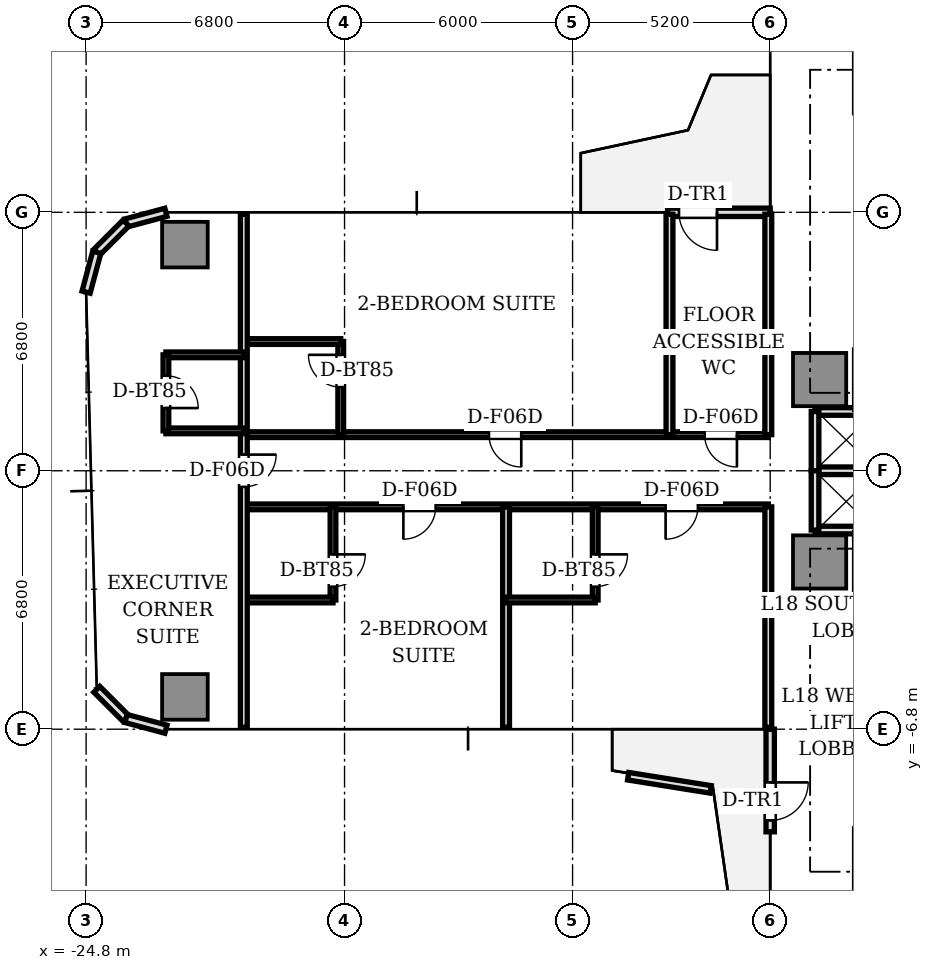
"""IFC4 building model, lengths in metres.
Left out: names, types, materials, properties, quantities, classifications, styles, units other than length and angle.
Written with IfcOpenShell. Run it as: python <this file> out.ifc"""

import sys

from ifc_helpers import new_model, si_unit, direction, frame, frame_2d, origin, origin_2d, place, context, subcontext, project, spatial, rectangle, extrude, source, transform, mapped, element, fill, save


model = new_model("IFC4")
c1 = context("Model", 3, precision=1e-05, world=origin(), true_north=direction((0.0, 1.0)))
c2 = subcontext(c1, "Body", "Model", "MODEL_VIEW")
j1 = project(units=[si_unit("LENGTHUNIT", "METRE"), si_unit("PLANEANGLEUNIT", "RADIAN")], contexts=[c1])
p1 = place(None, origin())
s1 = spatial("IfcSite", under=j1, at=p1, CompositionType="ELEMENT")
p2 = place(p1, origin())
s2 = spatial("IfcBuilding", under=s1, at=p2, CompositionType="ELEMENT")
p3 = place(p2, frame((0.0, 0.0, 67.8)))
s3 = spatial("IfcBuildingStorey", under=s2, at=p3, CompositionType="ELEMENT", Elevation=67.8)
m1 = source(origin(), c2, "Body", "SweptSolid", [
    extrude(rectangle(XDim=1.4, YDim=1.4, at=origin_2d()), origin(), (0.0, 0.0, 1.0), 3.11),
])
for number, where, z_axis, x_axis in (
    (1, (-5.5, 2.4, 0.0), (0.0, 0.0, 1.0), (1.0, 0.0, 0.0)),
    (2, (-5.5, -2.4, 0.0), (0.0, 0.0, 1.0), (1.0, 0.0, 0.0)),
):
    element("IfcColumn", number, at=place(p3, frame(where, z_axis=z_axis, x_axis=x_axis)), inside=s3, PredefinedType="COLUMN", context=c2, shape_type="MappedRepresentation", body=[
        mapped(m1, transform((0.0, 0.0, 0.0), scale=1.0)),
    ])
m2 = source(origin(), c2, "Body", "SweptSolid", [
    extrude(rectangle(XDim=1.2, YDim=1.2, at=origin_2d()), origin(), (0.0, 0.0, 1.0), 3.11),
])
for number, where, z_axis, x_axis in (
    (3, (-22.2, 5.95, 0.0), (0.0, 0.0, 1.0), (1.0, 0.0, 0.0)),
    (4, (-22.2, -5.95, 0.0), (0.0, 0.0, 1.0), (1.0, 0.0, 0.0)),
):
    element("IfcColumn", number, at=place(p3, frame(where, z_axis=z_axis, x_axis=x_axis)), inside=s3, PredefinedType="COLUMN", context=c2, shape_type="MappedRepresentation", body=[
        mapped(m2, transform((0.0, 0.0, 0.0), scale=1.0)),
    ])
p4 = place(p3, frame((-6.8, 6.8, 0.0), z_axis=(0.0, 0.0, 1.0), x_axis=(-1.0, 0.0, 0.0)))
e5 = element("IfcWall", 5, at=p4, inside=s3, PredefinedType="STANDARD", context=c2, shape_type="SweptSolid", body=[
    extrude(rectangle(XDim=2.7, YDim=0.22, at=frame_2d((1.35, 0.0))), origin(), (0.0, 0.0, 1.0), 3.11),
])
p5 = place(p4, frame((1.4, 0.0, 0.0)))
e6 = element("IfcOpeningElement", 6, at=p5, cuts=e5, PredefinedType="OPENING", context=c2, shape_type="SweptSolid", body=[
    extrude(rectangle(XDim=1.0, YDim=2.2, at=frame_2d((0.5, 1.1))), frame((0.0, 0.12, 0.0), z_axis=(0.0, -1.0, 0.0), x_axis=(1.0, 0.0, 0.0)), (0.0, 0.0, 1.0), 0.24),
])
for number, where, z_axis, x_axis in (
    (7, (-22.7, 6.8, 0.0), (0.0, 0.0, 1.0), (-0.966, -0.259, 0.0)),
    (8, (-23.75, 6.519, 0.0), (0.0, 0.0, 1.0), (-0.707, -0.707, 0.0)),
    (9, (-24.519, 5.75, 0.0), (0.0, 0.0, 1.0), (-0.259, -0.966, 0.0)),
    (10, (-24.519, -5.75, 0.0), (0.0, 0.0, 1.0), (0.707, -0.707, 0.0)),
    (11, (-23.75, -6.519, 0.0), (0.0, 0.0, 1.0), (0.966, -0.259, 0.0)),
):
    element("IfcWall", number, at=place(p3, frame(where, z_axis=z_axis, x_axis=x_axis)), inside=s3, PredefinedType="STANDARD", context=c2, shape_type="SweptSolid", body=[
        extrude(rectangle(XDim=1.087, YDim=0.22, at=frame_2d((0.543, 0.0))), origin(), (0.0, 0.0, 1.0), 3.11),
    ])
p6 = place(p3, frame((-6.8, -6.8, 0.0), z_axis=(0.0, 0.0, 1.0), x_axis=(0.0, -1.0, 0.0)))
e12 = element("IfcWall", 12, at=p6, inside=s3, PredefinedType="STANDARD", context=c2, shape_type="SweptSolid", body=[
    extrude(rectangle(XDim=2.7, YDim=0.22, at=frame_2d((1.35, 0.0))), origin(), (0.0, 0.0, 1.0), 3.11),
])
p7 = place(p6, frame((1.4, 0.0, 0.0)))
e13 = element("IfcOpeningElement", 13, at=p7, cuts=e12, PredefinedType="OPENING", context=c2, shape_type="SweptSolid", body=[
    extrude(rectangle(XDim=1.0, YDim=2.2, at=frame_2d((0.5, 1.1))), frame((0.0, 0.12, 0.0), z_axis=(0.0, -1.0, 0.0), x_axis=(1.0, 0.0, 0.0)), (0.0, 0.0, 1.0), 0.24),
])
p8 = place(p3, frame((-10.537, -8.037, 0.0), z_axis=(0.0, 0.0, 1.0), x_axis=(0.987467647017, -0.1578215641, 0.0)))
e14 = element("IfcWall", 14, at=p8, inside=s3, PredefinedType="PARAPET", context=c2, shape_type="SweptSolid", body=[
    extrude(rectangle(XDim=2.198, YDim=0.2, at=frame_2d((1.099, 0.0))), origin(), (0.0, 0.0, 1.0), 0.65),
])
for number, where, z_axis, x_axis in (
    (15, (-5.62, 1.56, 0.0), (0.0, 0.0, 1.0), (1.0, 0.0, 0.0)),
    (16, (-5.62, -1.56, 0.0), (0.0, 0.0, 1.0), (1.0, 0.0, 0.0)),
    (17, (-5.62, 0.0, 0.0), (0.0, 0.0, 1.0), (1.0, 0.0, 0.0)),
):
    element("IfcWall", number, at=place(p3, frame(where, z_axis=z_axis, x_axis=x_axis)), inside=s3, PredefinedType="SOLIDWALL", context=c2, shape_type="SweptSolid", body=[
        extrude(rectangle(XDim=1.64, YDim=0.2, at=frame_2d((0.82, 0.0))), origin(), (0.0, 0.0, 1.0), 2.66),
    ])
for number, where, z_axis, x_axis in (
    (18, (-5.62, 0.0, 0.0), (0.0, 0.0, 1.0), (0.0, 1.0, 0.0)),
    (19, (-5.62, -1.56, 0.0), (0.0, 0.0, 1.0), (0.0, 1.0, 0.0)),
):
    element("IfcWall", number, at=place(p3, frame(where, z_axis=z_axis, x_axis=x_axis)), inside=s3, PredefinedType="SOLIDWALL", context=c2, shape_type="SweptSolid", body=[
        extrude(rectangle(XDim=1.56, YDim=0.2, at=frame_2d((0.78, 0.0))), origin(), (0.0, 0.0, 1.0), 2.66),
    ])
p9 = place(p3, frame((-6.85, -0.95, 0.0), z_axis=(0.0, 0.0, 1.0), x_axis=(-1.0, 0.0, 0.0)))
e20 = element("IfcWall", 20, at=p9, inside=s3, PredefinedType="PARTITIONING", context=c2, shape_type="SweptSolid", body=[
    extrude(rectangle(XDim=13.8, YDim=0.15, at=frame_2d((6.9, 0.0))), origin(), (0.0, 0.0, 1.0), 2.66),
])
p10 = place(p9, frame((1.852, 0.0, 0.0)))
e21 = element("IfcOpeningElement", 21, at=p10, cuts=e20, PredefinedType="OPENING", context=c2, shape_type="SweptSolid", body=[
    extrude(rectangle(XDim=0.85, YDim=2.1, at=frame_2d((0.425, 1.05))), frame((0.0, 0.085, 0.0), z_axis=(0.0, -1.0, 0.0), x_axis=(1.0, 0.0, 0.0)), (0.0, 0.0, 1.0), 0.17),
])
p11 = place(p9, frame((8.752, 0.0, 0.0)))
e22 = element("IfcOpeningElement", 22, at=p11, cuts=e20, PredefinedType="OPENING", context=c2, shape_type="SweptSolid", body=[
    extrude(rectangle(XDim=0.85, YDim=2.1, at=frame_2d((0.425, 1.05))), frame((0.0, 0.085, 0.0), z_axis=(0.0, -1.0, 0.0), x_axis=(1.0, 0.0, 0.0)), (0.0, 0.0, 1.0), 0.17),
])
p12 = place(p3, frame((-6.85, 0.95, 0.0), z_axis=(0.0, 0.0, 1.0), x_axis=(-1.0, 0.0, 0.0)))
e23 = element("IfcWall", 23, at=p12, inside=s3, PredefinedType="PARTITIONING", context=c2, shape_type="SweptSolid", body=[
    extrude(rectangle(XDim=13.8, YDim=0.15, at=frame_2d((6.9, 0.0))), origin(), (0.0, 0.0, 1.0), 2.66),
])
p13 = place(p12, frame((0.825, 0.0, 0.0)))
e24 = element("IfcOpeningElement", 24, at=p13, cuts=e23, PredefinedType="OPENING", context=c2, shape_type="SweptSolid", body=[
    extrude(rectangle(XDim=0.85, YDim=2.1, at=frame_2d((0.425, 1.05))), frame((0.0, 0.085, 0.0), z_axis=(0.0, -1.0, 0.0), x_axis=(1.0, 0.0, 0.0)), (0.0, 0.0, 1.0), 0.17),
])
p14 = place(p12, frame((6.5, 0.0, 0.0)))
e25 = element("IfcOpeningElement", 25, at=p14, cuts=e23, PredefinedType="OPENING", context=c2, shape_type="SweptSolid", body=[
    extrude(rectangle(XDim=0.85, YDim=2.1, at=frame_2d((0.425, 1.05))), frame((0.0, 0.085, 0.0), z_axis=(0.0, -1.0, 0.0), x_axis=(1.0, 0.0, 0.0)), (0.0, 0.0, 1.0), 0.17),
])
for number, where, z_axis, x_axis in (
    (26, (-6.85, -0.95, 0.0), (0.0, 0.0, 1.0), (0.0, -1.0, 0.0)),
    (27, (-6.85, 6.75, 0.0), (0.0, 0.0, 1.0), (0.0, -1.0, 0.0)),
    (28, (-13.75, -0.95, 0.0), (0.0, 0.0, 1.0), (0.0, -1.0, 0.0)),
):
    element("IfcWall", number, at=place(p3, frame(where, z_axis=z_axis, x_axis=x_axis)), inside=s3, PredefinedType="PARTITIONING", context=c2, shape_type="SweptSolid", body=[
        extrude(rectangle(XDim=5.8, YDim=0.18, at=frame_2d((2.9, 0.0))), origin(), (0.0, 0.0, 1.0), 2.66),
    ])
p15 = place(p3, frame((-11.404, -0.95, 0.0), z_axis=(0.0, 0.0, 1.0), x_axis=(0.0, -1.0, 0.0)))
e29 = element("IfcWall", 29, at=p15, inside=s3, PredefinedType="PARTITIONING", context=c2, shape_type="SweptSolid", body=[
    extrude(rectangle(XDim=2.45, YDim=0.15, at=frame_2d((1.225, 0.0))), origin(), (0.0, 0.0, 1.0), 2.66),
])
p16 = place(p15, frame((1.25, 0.0, 0.0)))
e30 = element("IfcOpeningElement", 30, at=p16, cuts=e29, PredefinedType="OPENING", context=c2, shape_type="SweptSolid", body=[
    extrude(rectangle(XDim=0.85, YDim=2.1, at=frame_2d((0.425, 1.05))), frame((0.0, 0.085, 0.0), z_axis=(0.0, -1.0, 0.0), x_axis=(1.0, 0.0, 0.0)), (0.0, 0.0, 1.0), 0.17),
])
p17 = place(p3, frame((-11.404, -3.4, 0.0), z_axis=(0.0, 0.0, 1.0), x_axis=(-1.0, 0.0, 0.0)))
e31 = element("IfcWall", 31, at=p17, inside=s3, PredefinedType="PARTITIONING", context=c2, shape_type="SweptSolid", body=[
    extrude(rectangle(XDim=2.346, YDim=0.15, at=frame_2d((1.173, 0.0))), origin(), (0.0, 0.0, 1.0), 2.63),
])
p18 = place(p3, frame((-18.304, -0.95, 0.0), z_axis=(0.0, 0.0, 1.0), x_axis=(0.0, -1.0, 0.0)))
e32 = element("IfcWall", 32, at=p18, inside=s3, PredefinedType="PARTITIONING", context=c2, shape_type="SweptSolid", body=[
    extrude(rectangle(XDim=2.45, YDim=0.15, at=frame_2d((1.225, 0.0))), origin(), (0.0, 0.0, 1.0), 2.66),
])
p19 = place(p18, frame((1.25, 0.0, 0.0)))
e33 = element("IfcOpeningElement", 33, at=p19, cuts=e32, PredefinedType="OPENING", context=c2, shape_type="SweptSolid", body=[
    extrude(rectangle(XDim=0.85, YDim=2.1, at=frame_2d((0.425, 1.05))), frame((0.0, 0.085, 0.0), z_axis=(0.0, -1.0, 0.0), x_axis=(1.0, 0.0, 0.0)), (0.0, 0.0, 1.0), 0.17),
])
p20 = place(p3, frame((-18.304, -3.4, 0.0), z_axis=(0.0, 0.0, 1.0), x_axis=(-1.0, 0.0, 0.0)))
e34 = element("IfcWall", 34, at=p20, inside=s3, PredefinedType="PARTITIONING", context=c2, shape_type="SweptSolid", body=[
    extrude(rectangle(XDim=2.346, YDim=0.15, at=frame_2d((1.173, 0.0))), origin(), (0.0, 0.0, 1.0), 2.63),
])
p21 = place(p3, frame((-9.45, 0.95, 0.0), z_axis=(0.0, 0.0, 1.0), x_axis=(0.0, 1.0, 0.0)))
e35 = element("IfcWall", 35, at=p21, inside=s3, PredefinedType="PARTITIONING", context=c2, shape_type="SweptSolid", body=[
    extrude(rectangle(XDim=5.8, YDim=0.18, at=frame_2d((2.9, 0.0))), origin(), (0.0, 0.0, 1.0), 2.66),
])
p22 = place(p3, frame((-18.1, 0.95, 0.0), z_axis=(0.0, 0.0, 1.0), x_axis=(0.0, 1.0, 0.0)))
e36 = element("IfcWall", 36, at=p22, inside=s3, PredefinedType="PARTITIONING", context=c2, shape_type="SweptSolid", body=[
    extrude(rectangle(XDim=2.45, YDim=0.15, at=frame_2d((1.225, 0.0))), origin(), (0.0, 0.0, 1.0), 2.66),
])
p23 = place(p22, frame((1.25, 0.0, 0.0)))
e37 = element("IfcOpeningElement", 37, at=p23, cuts=e36, PredefinedType="OPENING", context=c2, shape_type="SweptSolid", body=[
    extrude(rectangle(XDim=0.85, YDim=2.1, at=frame_2d((0.425, 1.05))), frame((0.0, 0.085, 0.0), z_axis=(0.0, -1.0, 0.0), x_axis=(1.0, 0.0, 0.0)), (0.0, 0.0, 1.0), 0.17),
])
p24 = place(p3, frame((-18.1, 3.4, 0.0), z_axis=(0.0, 0.0, 1.0), x_axis=(-1.0, 0.0, 0.0)))
e38 = element("IfcWall", 38, at=p24, inside=s3, PredefinedType="PARTITIONING", context=c2, shape_type="SweptSolid", body=[
    extrude(rectangle(XDim=2.55, YDim=0.15, at=frame_2d((1.275, 0.0))), origin(), (0.0, 0.0, 1.0), 2.63),
])
p25 = place(p3, frame((-20.65, 6.75, 0.0), z_axis=(0.0, 0.0, 1.0), x_axis=(0.0, -1.0, 0.0)))
e39 = element("IfcWall", 39, at=p25, inside=s3, PredefinedType="PARTITIONING", context=c2, shape_type="SweptSolid", body=[
    extrude(rectangle(XDim=13.5, YDim=0.18, at=frame_2d((6.75, 0.0))), origin(), (0.0, 0.0, 1.0), 2.66),
])
p26 = place(p25, frame((6.325, 0.0, 0.0)))
e40 = element("IfcOpeningElement", 40, at=p26, cuts=e39, PredefinedType="OPENING", context=c2, shape_type="SweptSolid", body=[
    extrude(rectangle(XDim=0.85, YDim=2.1, at=frame_2d((0.425, 1.05))), frame((0.0, 0.1, 0.0), z_axis=(0.0, -1.0, 0.0), x_axis=(1.0, 0.0, 0.0)), (0.0, 0.0, 1.0), 0.2),
])
p27 = place(p3, frame((-20.65, 1.05, 0.0), z_axis=(0.0, 0.0, 1.0), x_axis=(-1.0, 0.0, 0.0)))
e41 = element("IfcWall", 41, at=p27, inside=s3, PredefinedType="PARTITIONING", context=c2, shape_type="SweptSolid", body=[
    extrude(rectangle(XDim=2.05, YDim=0.15, at=frame_2d((1.025, 0.0))), origin(), (0.0, 0.0, 1.0), 2.66),
])
p28 = place(p3, frame((-20.65, 3.05, 0.0), z_axis=(0.0, 0.0, 1.0), x_axis=(-1.0, 0.0, 0.0)))
e42 = element("IfcWall", 42, at=p28, inside=s3, PredefinedType="PARTITIONING", context=c2, shape_type="SweptSolid", body=[
    extrude(rectangle(XDim=2.05, YDim=0.15, at=frame_2d((1.025, 0.0))), origin(), (0.0, 0.0, 1.0), 2.63),
])
p29 = place(p3, frame((-22.7, 3.05, 0.0), z_axis=(0.0, 0.0, 1.0), x_axis=(0.0, -1.0, 0.0)))
e43 = element("IfcWall", 43, at=p29, inside=s3, PredefinedType="PARTITIONING", context=c2, shape_type="SweptSolid", body=[
    extrude(rectangle(XDim=2.0, YDim=0.15, at=frame_2d((1.0, 0.0))), origin(), (0.0, 0.0, 1.0), 2.66),
])
p30 = place(p29, frame((0.55, 0.0, 0.0)))
e44 = element("IfcOpeningElement", 44, at=p30, cuts=e43, PredefinedType="OPENING", context=c2, shape_type="SweptSolid", body=[
    extrude(rectangle(XDim=0.85, YDim=2.1, at=frame_2d((0.425, 1.05))), frame((0.0, 0.085, 0.0), z_axis=(0.0, -1.0, 0.0), x_axis=(1.0, 0.0, 0.0)), (0.0, 0.0, 1.0), 0.17),
])
m3 = source(origin(), c2, "Body", "SweptSolid", [
    extrude(rectangle(XDim=1.0, YDim=0.05, at=origin_2d()), origin(), (0.0, 0.0, 1.0), 2.2),
])
p31 = place(p5, frame((0.5, 0.0, 0.0)))
e45 = element("IfcDoor", 45, at=p31, inside=s3, OperationType="SINGLE_SWING_LEFT", PredefinedType="DOOR", context=c2, shape_type="MappedRepresentation", body=[
    mapped(m3, transform((0.0, 0.0, 0.0), scale=1.0)),
])
fill(e6, e45)
p32 = place(p7, frame((0.5, 0.0, 0.0)))
e46 = element("IfcDoor", 46, at=p32, inside=s3, OperationType="SINGLE_SWING_LEFT", PredefinedType="DOOR", context=c2, shape_type="MappedRepresentation", body=[
    mapped(m3, transform((0.0, 0.0, 0.0), scale=1.0)),
])
fill(e13, e46)
m4 = source(origin(), c2, "Body", "SweptSolid", [
    extrude(rectangle(XDim=0.85, YDim=0.05, at=origin_2d()), origin(), (0.0, 0.0, 1.0), 2.1),
])
p33 = place(p16, frame((0.425, 0.0, 0.0)))
e47 = element("IfcDoor", 47, at=p33, inside=s3, OperationType="SINGLE_SWING_LEFT", PredefinedType="DOOR", context=c2, shape_type="MappedRepresentation", body=[
    mapped(m4, transform((0.0, 0.0, 0.0), scale=1.0)),
])
fill(e30, e47)
p34 = place(p10, frame((0.425, 0.0, 0.0)))
e48 = element("IfcDoor", 48, at=p34, inside=s3, OperationType="SINGLE_SWING_RIGHT", PredefinedType="DOOR", context=c2, shape_type="MappedRepresentation", body=[
    mapped(m4, transform((0.0, 0.0, 0.0), scale=1.0)),
])
fill(e21, e48)
p35 = place(p19, frame((0.425, 0.0, 0.0)))
e49 = element("IfcDoor", 49, at=p35, inside=s3, OperationType="SINGLE_SWING_LEFT", PredefinedType="DOOR", context=c2, shape_type="MappedRepresentation", body=[
    mapped(m4, transform((0.0, 0.0, 0.0), scale=1.0)),
])
fill(e33, e49)
p36 = place(p11, frame((0.425, 0.0, 0.0)))
e50 = element("IfcDoor", 50, at=p36, inside=s3, OperationType="SINGLE_SWING_RIGHT", PredefinedType="DOOR", context=c2, shape_type="MappedRepresentation", body=[
    mapped(m4, transform((0.0, 0.0, 0.0), scale=1.0)),
])
fill(e22, e50)
p37 = place(p13, frame((0.425, 0.0, 0.0)))
e51 = element("IfcDoor", 51, at=p37, inside=s3, OperationType="SINGLE_SWING_LEFT", PredefinedType="DOOR", context=c2, shape_type="MappedRepresentation", body=[
    mapped(m4, transform((0.0, 0.0, 0.0), scale=1.0)),
])
fill(e24, e51)
p38 = place(p23, frame((0.425, 0.0, 0.0)))
e52 = element("IfcDoor", 52, at=p38, inside=s3, OperationType="SINGLE_SWING_RIGHT", PredefinedType="DOOR", context=c2, shape_type="MappedRepresentation", body=[
    mapped(m4, transform((0.0, 0.0, 0.0), scale=1.0)),
])
fill(e37, e52)
p39 = place(p14, frame((0.425, 0.0, 0.0)))
e53 = element("IfcDoor", 53, at=p39, inside=s3, OperationType="SINGLE_SWING_LEFT", PredefinedType="DOOR", context=c2, shape_type="MappedRepresentation", body=[
    mapped(m4, transform((0.0, 0.0, 0.0), scale=1.0)),
])
fill(e25, e53)
p40 = place(p30, frame((0.425, 0.0, 0.0)))
e54 = element("IfcDoor", 54, at=p40, inside=s3, OperationType="SINGLE_SWING_RIGHT", PredefinedType="DOOR", context=c2, shape_type="MappedRepresentation", body=[
    mapped(m4, transform((0.0, 0.0, 0.0), scale=1.0)),
])
fill(e44, e54)
p41 = place(p26, frame((0.425, 0.0, 0.0)))
e55 = element("IfcDoor", 55, at=p41, inside=s3, OperationType="SINGLE_SWING_LEFT", PredefinedType="DOOR", context=c2, shape_type="MappedRepresentation", body=[
    mapped(m4, transform((0.0, 0.0, 0.0), scale=1.0)),
])
fill(e40, e55)
save(model, sys.argv[1])
